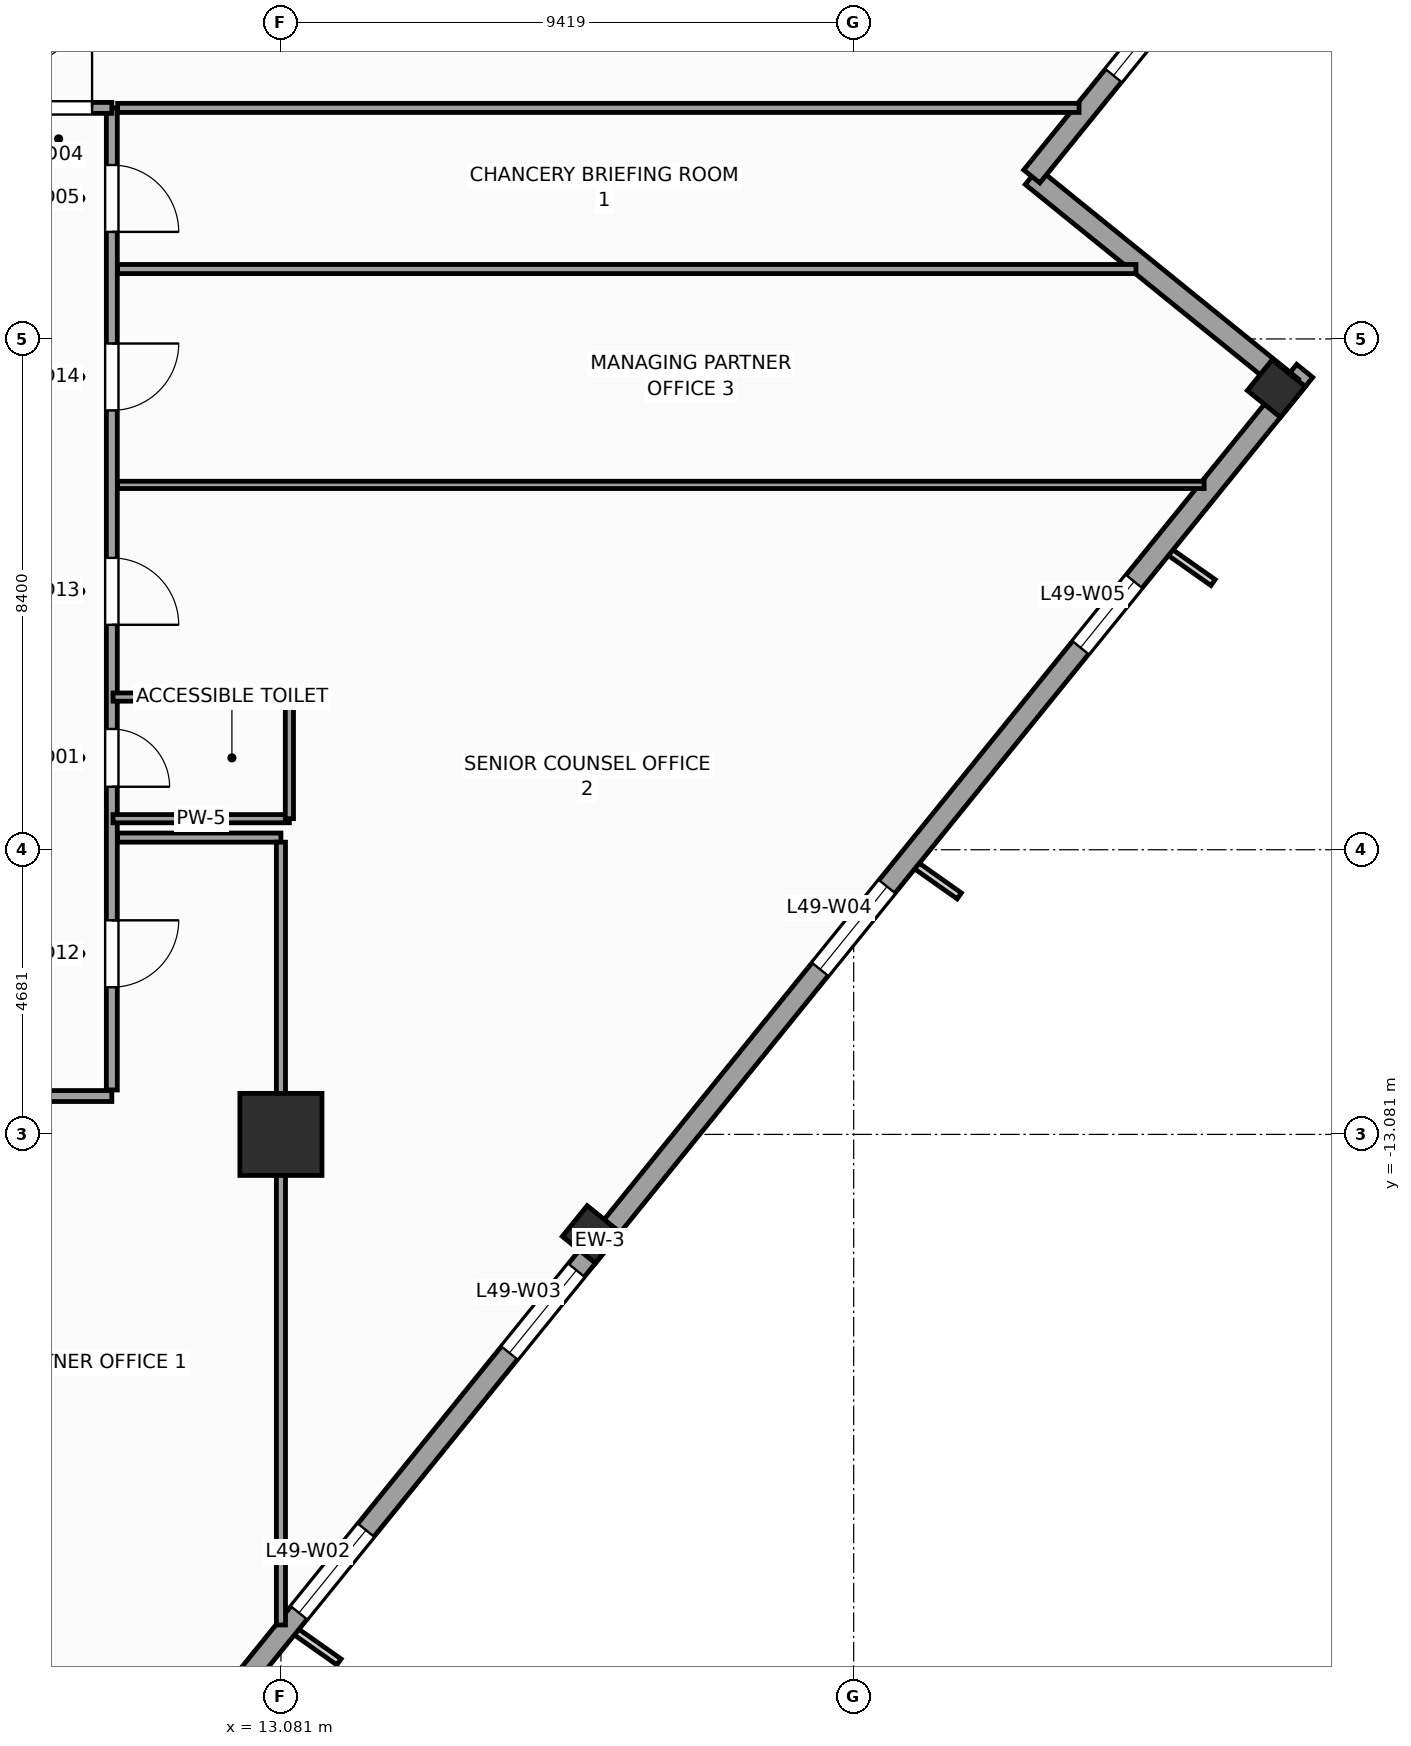
"""IFC4 building model, lengths in metres.
Left out: names, types, materials, properties, quantities, classifications, styles, units other than length and angle.
Written with IfcOpenShell. Run it as: python <this file> out.ifc"""

import sys

from ifc_helpers import new_model, si_unit, direction, frame, frame_2d, origin, origin_2d, place, context, subcontext, project, spatial, rectangle, extrude, source, transform, mapped, element, fill, save


model = new_model("IFC4")
c1 = context("Model", 3, precision=1e-05, world=origin(), true_north=direction((0.0, 1.0)))
c2 = subcontext(c1, "Body", "Model", "MODEL_VIEW")
j1 = project(units=[si_unit("LENGTHUNIT", "METRE"), si_unit("PLANEANGLEUNIT", "RADIAN")], contexts=[c1])
p1 = place(None, origin())
s1 = spatial("IfcSite", under=j1, at=p1, CompositionType="ELEMENT")
p2 = place(p1, origin())
s2 = spatial("IfcBuilding", under=s1, at=p2, CompositionType="ELEMENT")
p3 = place(p2, frame((0.0, 0.0, 205.6)))
s3 = spatial("IfcBuildingStorey", under=s2, at=p3, CompositionType="ELEMENT", Elevation=205.6)
m1 = source(origin(), c2, "Body", "SweptSolid", [
    extrude(rectangle(XDim=1.35, YDim=1.35, at=origin_2d()), origin(), (0.0, 0.0, 1.0), 3.9),
])
p4 = place(p3, frame((13.081, -13.081, 0.0), z_axis=(0.0, 0.0, 1.0), x_axis=(1.0, 0.0, 0.0)))
e1 = element("IfcColumn", 1, at=p4, inside=s3, PredefinedType="COLUMN", context=c2, shape_type="MappedRepresentation", body=[
    mapped(m1, transform((0.0, 0.0, 0.0), scale=1.0)),
])
m2 = source(origin(), c2, "Body", "SweptSolid", [
    extrude(rectangle(XDim=0.65, YDim=0.7, at=origin_2d()), origin(), (0.0, 0.0, 1.0), 3.9),
])
for number, where, z_axis, x_axis in (
    (2, (18.185, -14.726, 0.0), (0.0, 0.0, 1.0), (0.629, 0.777, 0.0)),
    (3, (29.45, -0.815, 0.0), (0.0, 0.0, 1.0), (0.629, 0.777, 0.0)),
):
    element("IfcColumn", number, at=place(p3, frame(where, z_axis=z_axis, x_axis=x_axis)), inside=s3, PredefinedType="COLUMN", context=c2, shape_type="MappedRepresentation", body=[
        mapped(m2, transform((0.0, 0.0, 0.0), scale=1.0)),
    ])
p5 = place(p3, frame((6.733, -29.154, 0.0), z_axis=(0.0, 0.0, 1.0), x_axis=(0.629325378072, 0.77714192302, 0.0)))
e4 = element("IfcWall", 4, at=p5, inside=s3, PredefinedType="STANDARD", context=c2, shape_type="SweptSolid", body=[
    extrude(rectangle(XDim=36.84, YDim=0.34, at=frame_2d((18.42, 0.0))), origin(), (0.0, 0.0, 1.0), 2.96),
])
p6 = place(p5, frame((3.721, 0.0, 0.48)))
e5 = element("IfcOpeningElement", 5, at=p6, cuts=e4, PredefinedType="OPENING", context=c2, shape_type="SweptSolid", body=[
    extrude(rectangle(XDim=1.4, YDim=2.4, at=frame_2d((0.7, 1.2))), frame((0.0, 0.18, 0.0), z_axis=(0.0, -1.0, 0.0), x_axis=(1.0, 0.0, 0.0)), (0.0, 0.0, 1.0), 0.36),
])
p7 = place(p5, frame((10.559, 0.0, 0.58)))
e6 = element("IfcOpeningElement", 6, at=p7, cuts=e4, PredefinedType="OPENING", context=c2, shape_type="SweptSolid", body=[
    extrude(rectangle(XDim=1.75, YDim=2.3, at=frame_2d((0.875, 1.15))), frame((0.0, 0.18, 0.0), z_axis=(0.0, -1.0, 0.0), x_axis=(1.0, 0.0, 0.0)), (0.0, 0.0, 1.0), 0.36),
])
p8 = place(p5, frame((16.058, 0.0, 0.58)))
e7 = element("IfcOpeningElement", 7, at=p8, cuts=e4, PredefinedType="OPENING", context=c2, shape_type="SweptSolid", body=[
    extrude(rectangle(XDim=1.75, YDim=2.3, at=frame_2d((0.875, 1.15))), frame((0.0, 0.18, 0.0), z_axis=(0.0, -1.0, 0.0), x_axis=(1.0, 0.0, 0.0)), (0.0, 0.0, 1.0), 0.36),
])
p9 = place(p5, frame((24.176, 0.0, 0.58)))
e8 = element("IfcOpeningElement", 8, at=p9, cuts=e4, PredefinedType="OPENING", context=c2, shape_type="SweptSolid", body=[
    extrude(rectangle(XDim=1.75, YDim=2.3, at=frame_2d((0.875, 1.15))), frame((0.0, 0.18, 0.0), z_axis=(0.0, -1.0, 0.0), x_axis=(1.0, 0.0, 0.0)), (0.0, 0.0, 1.0), 0.36),
])
p10 = place(p5, frame((30.982, 0.0, 0.48)))
e9 = element("IfcOpeningElement", 9, at=p10, cuts=e4, PredefinedType="OPENING", context=c2, shape_type="SweptSolid", body=[
    extrude(rectangle(XDim=1.4, YDim=2.4, at=frame_2d((0.7, 1.2))), frame((0.0, 0.18, 0.0), z_axis=(0.0, -1.0, 0.0), x_axis=(1.0, 0.0, 0.0)), (0.0, 0.0, 1.0), 0.36),
])
p11 = place(p3, frame((29.703, -0.789, 0.0), z_axis=(0.0, 0.0, 1.0), x_axis=(-0.77714355312, 0.629323365087, 0.0)))
e10 = element("IfcWall", 10, at=p11, inside=s3, PredefinedType="STANDARD", context=c2, shape_type="SweptSolid", body=[
    extrude(rectangle(XDim=5.5, YDim=0.34, at=frame_2d((2.75, 0.0))), origin(), (0.0, 0.0, 1.0), 3.66),
])
p12 = place(p3, frame((25.429, 2.673, 0.0), z_axis=(0.0, 0.0, 1.0), x_axis=(0.629299794138, 0.777162640055, 0.0)))
e11 = element("IfcWall", 11, at=p12, inside=s3, PredefinedType="STANDARD", context=c2, shape_type="SweptSolid", body=[
    extrude(rectangle(XDim=5.67, YDim=0.34, at=frame_2d((2.835, 0.0))), origin(), (0.0, 0.0, 1.0), 3.66),
])
p13 = place(p12, frame((2.135, 0.0, 0.48)))
e12 = element("IfcOpeningElement", 12, at=p13, cuts=e11, PredefinedType="OPENING", context=c2, shape_type="SweptSolid", body=[
    extrude(rectangle(XDim=1.4, YDim=2.4, at=frame_2d((0.7, 1.2))), frame((0.0, 0.18, 0.0), z_axis=(0.0, -1.0, 0.0), x_axis=(1.0, 0.0, 0.0)), (0.0, 0.0, 1.0), 0.36),
])
p14 = place(p3, frame((-11.45, -12.45, 0.0), z_axis=(0.0, 0.0, 1.0), x_axis=(1.0, 0.0, 0.0)))
e13 = element("IfcWall", 13, at=p14, inside=s3, PredefinedType="PARTITIONING", context=c2, shape_type="SweptSolid", body=[
    extrude(rectangle(XDim=21.75, YDim=0.18, at=frame_2d((10.875, 0.0))), origin(), (0.0, 0.0, 1.0), 3.66),
])
p15 = place(p14, frame((5.411, 0.0, 0.0)))
e14 = element("IfcOpeningElement", 14, at=p15, cuts=e13, PredefinedType="OPENING", context=c2, shape_type="SweptSolid", body=[
    extrude(rectangle(XDim=0.95, YDim=2.1, at=frame_2d((0.475, 1.05))), frame((0.0, 0.1, 0.0), z_axis=(0.0, -1.0, 0.0), x_axis=(1.0, 0.0, 0.0)), (0.0, 0.0, 1.0), 0.2),
])
p16 = place(p14, frame((1.839, 0.0, 0.0)))
e15 = element("IfcOpeningElement", 15, at=p16, cuts=e13, PredefinedType="OPENING", context=c2, shape_type="SweptSolid", body=[
    extrude(rectangle(XDim=1.1, YDim=2.2, at=frame_2d((0.55, 1.1))), frame((0.0, 0.1, 0.0), z_axis=(0.0, -1.0, 0.0), x_axis=(1.0, 0.0, 0.0)), (0.0, 0.0, 1.0), 0.2),
])
p17 = place(p14, frame((7.574, 0.0, 0.0)))
e16 = element("IfcOpeningElement", 16, at=p17, cuts=e13, PredefinedType="OPENING", context=c2, shape_type="SweptSolid", body=[
    extrude(rectangle(XDim=1.1, YDim=2.2, at=frame_2d((0.55, 1.1))), frame((0.0, 0.1, 0.0), z_axis=(0.0, -1.0, 0.0), x_axis=(1.0, 0.0, 0.0)), (0.0, 0.0, 1.0), 0.2),
])
p18 = place(p14, frame((11.05, 0.0, 0.0)))
e17 = element("IfcOpeningElement", 17, at=p18, cuts=e13, PredefinedType="OPENING", context=c2, shape_type="SweptSolid", body=[
    extrude(rectangle(XDim=1.1, YDim=2.2, at=frame_2d((0.55, 1.1))), frame((0.0, 0.1, 0.0), z_axis=(0.0, -1.0, 0.0), x_axis=(1.0, 0.0, 0.0)), (0.0, 0.0, 1.0), 0.2),
])
p19 = place(p14, frame((15.65, 0.0, 0.0)))
e18 = element("IfcOpeningElement", 18, at=p19, cuts=e13, PredefinedType="OPENING", context=c2, shape_type="SweptSolid", body=[
    extrude(rectangle(XDim=1.1, YDim=2.2, at=frame_2d((0.55, 1.1))), frame((0.0, 0.1, 0.0), z_axis=(0.0, -1.0, 0.0), x_axis=(1.0, 0.0, 0.0)), (0.0, 0.0, 1.0), 0.2),
])
p20 = place(p3, frame((10.3, -12.35, 0.0), z_axis=(0.0, 0.0, 1.0), x_axis=(0.0, 1.0, 0.0)))
e19 = element("IfcWall", 19, at=p20, inside=s3, PredefinedType="PARTITIONING", context=c2, shape_type="SweptSolid", body=[
    extrude(rectangle(XDim=16.15, YDim=0.18, at=frame_2d((8.075, 0.0))), origin(), (0.0, 0.0, 1.0), 3.66),
])
p21 = place(p20, frame((4.986, 0.0, 0.0)))
e20 = element("IfcOpeningElement", 20, at=p21, cuts=e19, PredefinedType="OPENING", context=c2, shape_type="SweptSolid", body=[
    extrude(rectangle(XDim=0.95, YDim=2.1, at=frame_2d((0.475, 1.05))), frame((0.0, 0.1, 0.0), z_axis=(0.0, -1.0, 0.0), x_axis=(1.0, 0.0, 0.0)), (0.0, 0.0, 1.0), 0.2),
])
p22 = place(p20, frame((14.111, 0.0, 0.0)))
e21 = element("IfcOpeningElement", 21, at=p22, cuts=e19, PredefinedType="OPENING", context=c2, shape_type="SweptSolid", body=[
    extrude(rectangle(XDim=1.1, YDim=2.2, at=frame_2d((0.55, 1.1))), frame((0.0, 0.1, 0.0), z_axis=(0.0, -1.0, 0.0), x_axis=(1.0, 0.0, 0.0)), (0.0, 0.0, 1.0), 0.2),
])
p23 = place(p20, frame((1.689, 0.0, 0.0)))
e22 = element("IfcOpeningElement", 22, at=p23, cuts=e19, PredefinedType="OPENING", context=c2, shape_type="SweptSolid", body=[
    extrude(rectangle(XDim=1.1, YDim=2.2, at=frame_2d((0.55, 1.1))), frame((0.0, 0.1, 0.0), z_axis=(0.0, -1.0, 0.0), x_axis=(1.0, 0.0, 0.0)), (0.0, 0.0, 1.0), 0.2),
])
p24 = place(p20, frame((7.65, 0.0, 0.0)))
e23 = element("IfcOpeningElement", 23, at=p24, cuts=e19, PredefinedType="OPENING", context=c2, shape_type="SweptSolid", body=[
    extrude(rectangle(XDim=1.1, YDim=2.2, at=frame_2d((0.55, 1.1))), frame((0.0, 0.1, 0.0), z_axis=(0.0, -1.0, 0.0), x_axis=(1.0, 0.0, 0.0)), (0.0, 0.0, 1.0), 0.2),
])
p25 = place(p20, frame((11.175, 0.0, 0.0)))
e24 = element("IfcOpeningElement", 24, at=p25, cuts=e19, PredefinedType="OPENING", context=c2, shape_type="SweptSolid", body=[
    extrude(rectangle(XDim=1.1, YDim=2.2, at=frame_2d((0.55, 1.1))), frame((0.0, 0.1, 0.0), z_axis=(0.0, -1.0, 0.0), x_axis=(1.0, 0.0, 0.0)), (0.0, 0.0, 1.0), 0.2),
])
p26 = place(p3, frame((8.55, 3.8, 0.0), z_axis=(0.0, 0.0, 1.0), x_axis=(1.0, 0.0, 0.0)))
e25 = element("IfcWall", 25, at=p26, inside=s3, PredefinedType="PARTITIONING", context=c2, shape_type="SweptSolid", body=[
    extrude(rectangle(XDim=1.75, YDim=0.18, at=frame_2d((0.875, 0.0))), origin(), (0.0, 0.0, 1.0), 3.66),
])
p27 = place(p26, frame((0.325, 0.0, 0.0)))
e26 = element("IfcOpeningElement", 26, at=p27, cuts=e25, PredefinedType="OPENING", context=c2, shape_type="SweptSolid", body=[
    extrude(rectangle(XDim=1.1, YDim=2.2, at=frame_2d((0.55, 1.1))), frame((0.0, 0.1, 0.0), z_axis=(0.0, -1.0, 0.0), x_axis=(1.0, 0.0, 0.0)), (0.0, 0.0, 1.0), 0.2),
])
p28 = place(p3, frame((10.395, 1.15, 0.0), z_axis=(0.0, 0.0, 1.0), x_axis=(1.0, 0.0, 0.0)))
e27 = element("IfcWall", 27, at=p28, inside=s3, PredefinedType="PARTITIONING", context=c2, shape_type="SweptSolid", body=[
    extrude(rectangle(XDim=16.747, YDim=0.15, at=frame_2d((8.374, 0.0))), origin(), (0.0, 0.0, 1.0), 3.66),
])
p29 = place(p3, frame((10.395, 3.8, 0.0), z_axis=(0.0, 0.0, 1.0), x_axis=(1.0, 0.0, 0.0)))
e28 = element("IfcWall", 28, at=p29, inside=s3, PredefinedType="PARTITIONING", context=c2, shape_type="SweptSolid", body=[
    extrude(rectangle(XDim=15.812, YDim=0.15, at=frame_2d((7.906, 0.0))), origin(), (0.0, 0.0, 1.0), 3.66),
])
p30 = place(p3, frame((10.395, -8.2, 0.0), z_axis=(0.0, 0.0, 1.0), x_axis=(1.0, 0.0, 0.0)))
e29 = element("IfcWall", 29, at=p30, inside=s3, PredefinedType="PARTITIONING", context=c2, shape_type="SweptSolid", body=[
    extrude(rectangle(XDim=2.686, YDim=0.15, at=frame_2d((1.343, 0.0))), origin(), (0.0, 0.0, 1.0), 3.66),
])
p31 = place(p3, frame((13.081, -8.275, 0.0), z_axis=(0.0, 0.0, 1.0), x_axis=(0.0, -1.0, 0.0)))
e30 = element("IfcWall", 30, at=p31, inside=s3, PredefinedType="PARTITIONING", context=c2, shape_type="SweptSolid", body=[
    extrude(rectangle(XDim=12.874, YDim=0.15, at=frame_2d((6.437, 0.0))), origin(), (0.0, 0.0, 1.0), 2.76),
])
p32 = place(p3, frame((10.395, -2.4, 0.0), z_axis=(0.0, 0.0, 1.0), x_axis=(1.0, 0.0, 0.0)))
e31 = element("IfcWall", 31, at=p32, inside=s3, PredefinedType="PARTITIONING", context=c2, shape_type="SweptSolid", body=[
    extrude(rectangle(XDim=17.868, YDim=0.12, at=frame_2d((8.934, 0.0))), origin(), (0.0, 0.0, 1.0), 3.66),
])
p33 = place(p3, frame((10.32, -7.889, 0.0), z_axis=(0.0, 0.0, 1.0), x_axis=(1.0, 0.0, 0.0)))
e32 = element("IfcWall", 32, at=p33, inside=s3, PredefinedType="PARTITIONING", context=c2, shape_type="SweptSolid", body=[
    extrude(rectangle(XDim=2.9, YDim=0.135, at=frame_2d((1.45, 0.0))), origin(), (0.0, 0.0, 1.0), 3.66),
])
p34 = place(p3, frame((13.22, -7.889, 0.0), z_axis=(0.0, 0.0, 1.0), x_axis=(0.0, 1.0, 0.0)))
e33 = element("IfcWall", 33, at=p34, inside=s3, PredefinedType="PARTITIONING", context=c2, shape_type="SweptSolid", body=[
    extrude(rectangle(XDim=2.0, YDim=0.135, at=frame_2d((1.0, 0.0))), origin(), (0.0, 0.0, 1.0), 2.76),
])
p35 = place(p3, frame((10.32, -5.889, 0.0), z_axis=(0.0, 0.0, 1.0), x_axis=(1.0, 0.0, 0.0)))
e34 = element("IfcWall", 34, at=p35, inside=s3, PredefinedType="PARTITIONING", context=c2, shape_type="SweptSolid", body=[
    extrude(rectangle(XDim=2.9, YDim=0.135, at=frame_2d((1.45, 0.0))), origin(), (0.0, 0.0, 1.0), 3.66),
])
m3 = source(origin(), c2, "Body", "SweptSolid", [
    extrude(rectangle(XDim=1.75, YDim=2.3, at=frame_2d((0.875, 1.15))), frame((0.0, 0.03, 0.0), z_axis=(0.0, -1.0, 0.0), x_axis=(1.0, 0.0, 0.0)), (0.0, 0.0, 1.0), 0.06),
])
p36 = place(p7, origin())
e35 = element("IfcWindow", 35, at=p36, inside=s3, PartitioningType="SINGLE_PANEL", PredefinedType="WINDOW", context=c2, shape_type="MappedRepresentation", body=[
    mapped(m3, transform((0.0, 0.0, 0.0), scale=1.0)),
])
fill(e6, e35)
p37 = place(p8, origin())
e36 = element("IfcWindow", 36, at=p37, inside=s3, PartitioningType="SINGLE_PANEL", PredefinedType="WINDOW", context=c2, shape_type="MappedRepresentation", body=[
    mapped(m3, transform((0.0, 0.0, 0.0), scale=1.0)),
])
fill(e7, e36)
p38 = place(p9, origin())
e37 = element("IfcWindow", 37, at=p38, inside=s3, PartitioningType="SINGLE_PANEL", PredefinedType="WINDOW", context=c2, shape_type="MappedRepresentation", body=[
    mapped(m3, transform((0.0, 0.0, 0.0), scale=1.0)),
])
fill(e8, e37)
m4 = source(origin(), c2, "Body", "SweptSolid", [
    extrude(rectangle(XDim=1.4, YDim=2.4, at=frame_2d((0.7, 1.2))), frame((0.0, 0.03, 0.0), z_axis=(0.0, -1.0, 0.0), x_axis=(1.0, 0.0, 0.0)), (0.0, 0.0, 1.0), 0.06),
])
p39 = place(p10, origin())
e38 = element("IfcWindow", 38, at=p39, inside=s3, PartitioningType="SINGLE_PANEL", PredefinedType="WINDOW", context=c2, shape_type="MappedRepresentation", body=[
    mapped(m4, transform((0.0, 0.0, 0.0), scale=1.0)),
])
fill(e9, e38)
p40 = place(p13, origin())
e39 = element("IfcWindow", 39, at=p40, inside=s3, PartitioningType="SINGLE_PANEL", PredefinedType="WINDOW", context=c2, shape_type="MappedRepresentation", body=[
    mapped(m4, transform((0.0, 0.0, 0.0), scale=1.0)),
])
fill(e12, e39)
m5 = source(origin(), c2, "Body", "SweptSolid", [
    extrude(rectangle(XDim=0.95, YDim=2.1, at=frame_2d((0.475, 1.05))), frame((0.0, 0.025, 0.0), z_axis=(0.0, -1.0, 0.0), x_axis=(1.0, 0.0, 0.0)), (0.0, 0.0, 1.0), 0.05),
])
p41 = place(p21, frame((0.95, 0.0, 0.0), z_axis=(0.0, 0.0, 1.0), x_axis=(-1.0, 0.0, 0.0)))
e40 = element("IfcDoor", 40, at=p41, inside=s3, OperationType="SINGLE_SWING_LEFT", PredefinedType="DOOR", context=c2, shape_type="MappedRepresentation", body=[
    mapped(m5, transform((0.0, 0.0, 0.0), scale=1.0)),
])
fill(e20, e40)
m6 = source(origin(), c2, "Body", "SweptSolid", [
    extrude(rectangle(XDim=1.1, YDim=2.2, at=frame_2d((0.55, 1.1))), frame((0.0, 0.025, 0.0), z_axis=(0.0, -1.0, 0.0), x_axis=(1.0, 0.0, 0.0)), (0.0, 0.0, 1.0), 0.05),
])
p42 = place(p27, origin())
e41 = element("IfcDoor", 41, at=p42, inside=s3, OperationType="SINGLE_SWING_RIGHT", PredefinedType="DOOR", context=c2, shape_type="MappedRepresentation", body=[
    mapped(m6, transform((0.0, 0.0, 0.0), scale=1.0)),
])
fill(e26, e41)
p43 = place(p22, frame((1.1, 0.0, 0.0), z_axis=(0.0, 0.0, 1.0), x_axis=(-1.0, 0.0, 0.0)))
e42 = element("IfcDoor", 42, at=p43, inside=s3, OperationType="SINGLE_SWING_LEFT", PredefinedType="DOOR", context=c2, shape_type="MappedRepresentation", body=[
    mapped(m6, transform((0.0, 0.0, 0.0), scale=1.0)),
])
fill(e21, e42)
p44 = place(p23, frame((1.1, 0.0, 0.0), z_axis=(0.0, 0.0, 1.0), x_axis=(-1.0, 0.0, 0.0)))
e43 = element("IfcDoor", 43, at=p44, inside=s3, OperationType="SINGLE_SWING_RIGHT", PredefinedType="DOOR", context=c2, shape_type="MappedRepresentation", body=[
    mapped(m6, transform((0.0, 0.0, 0.0), scale=1.0)),
])
fill(e22, e43)
p45 = place(p24, frame((1.1, 0.0, 0.0), z_axis=(0.0, 0.0, 1.0), x_axis=(-1.0, 0.0, 0.0)))
e44 = element("IfcDoor", 44, at=p45, inside=s3, OperationType="SINGLE_SWING_LEFT", PredefinedType="DOOR", context=c2, shape_type="MappedRepresentation", body=[
    mapped(m6, transform((0.0, 0.0, 0.0), scale=1.0)),
])
fill(e23, e44)
p46 = place(p25, frame((1.1, 0.0, 0.0), z_axis=(0.0, 0.0, 1.0), x_axis=(-1.0, 0.0, 0.0)))
e45 = element("IfcDoor", 45, at=p46, inside=s3, OperationType="SINGLE_SWING_RIGHT", PredefinedType="DOOR", context=c2, shape_type="MappedRepresentation", body=[
    mapped(m6, transform((0.0, 0.0, 0.0), scale=1.0)),
])
fill(e24, e45)
save(model, sys.argv[1])
